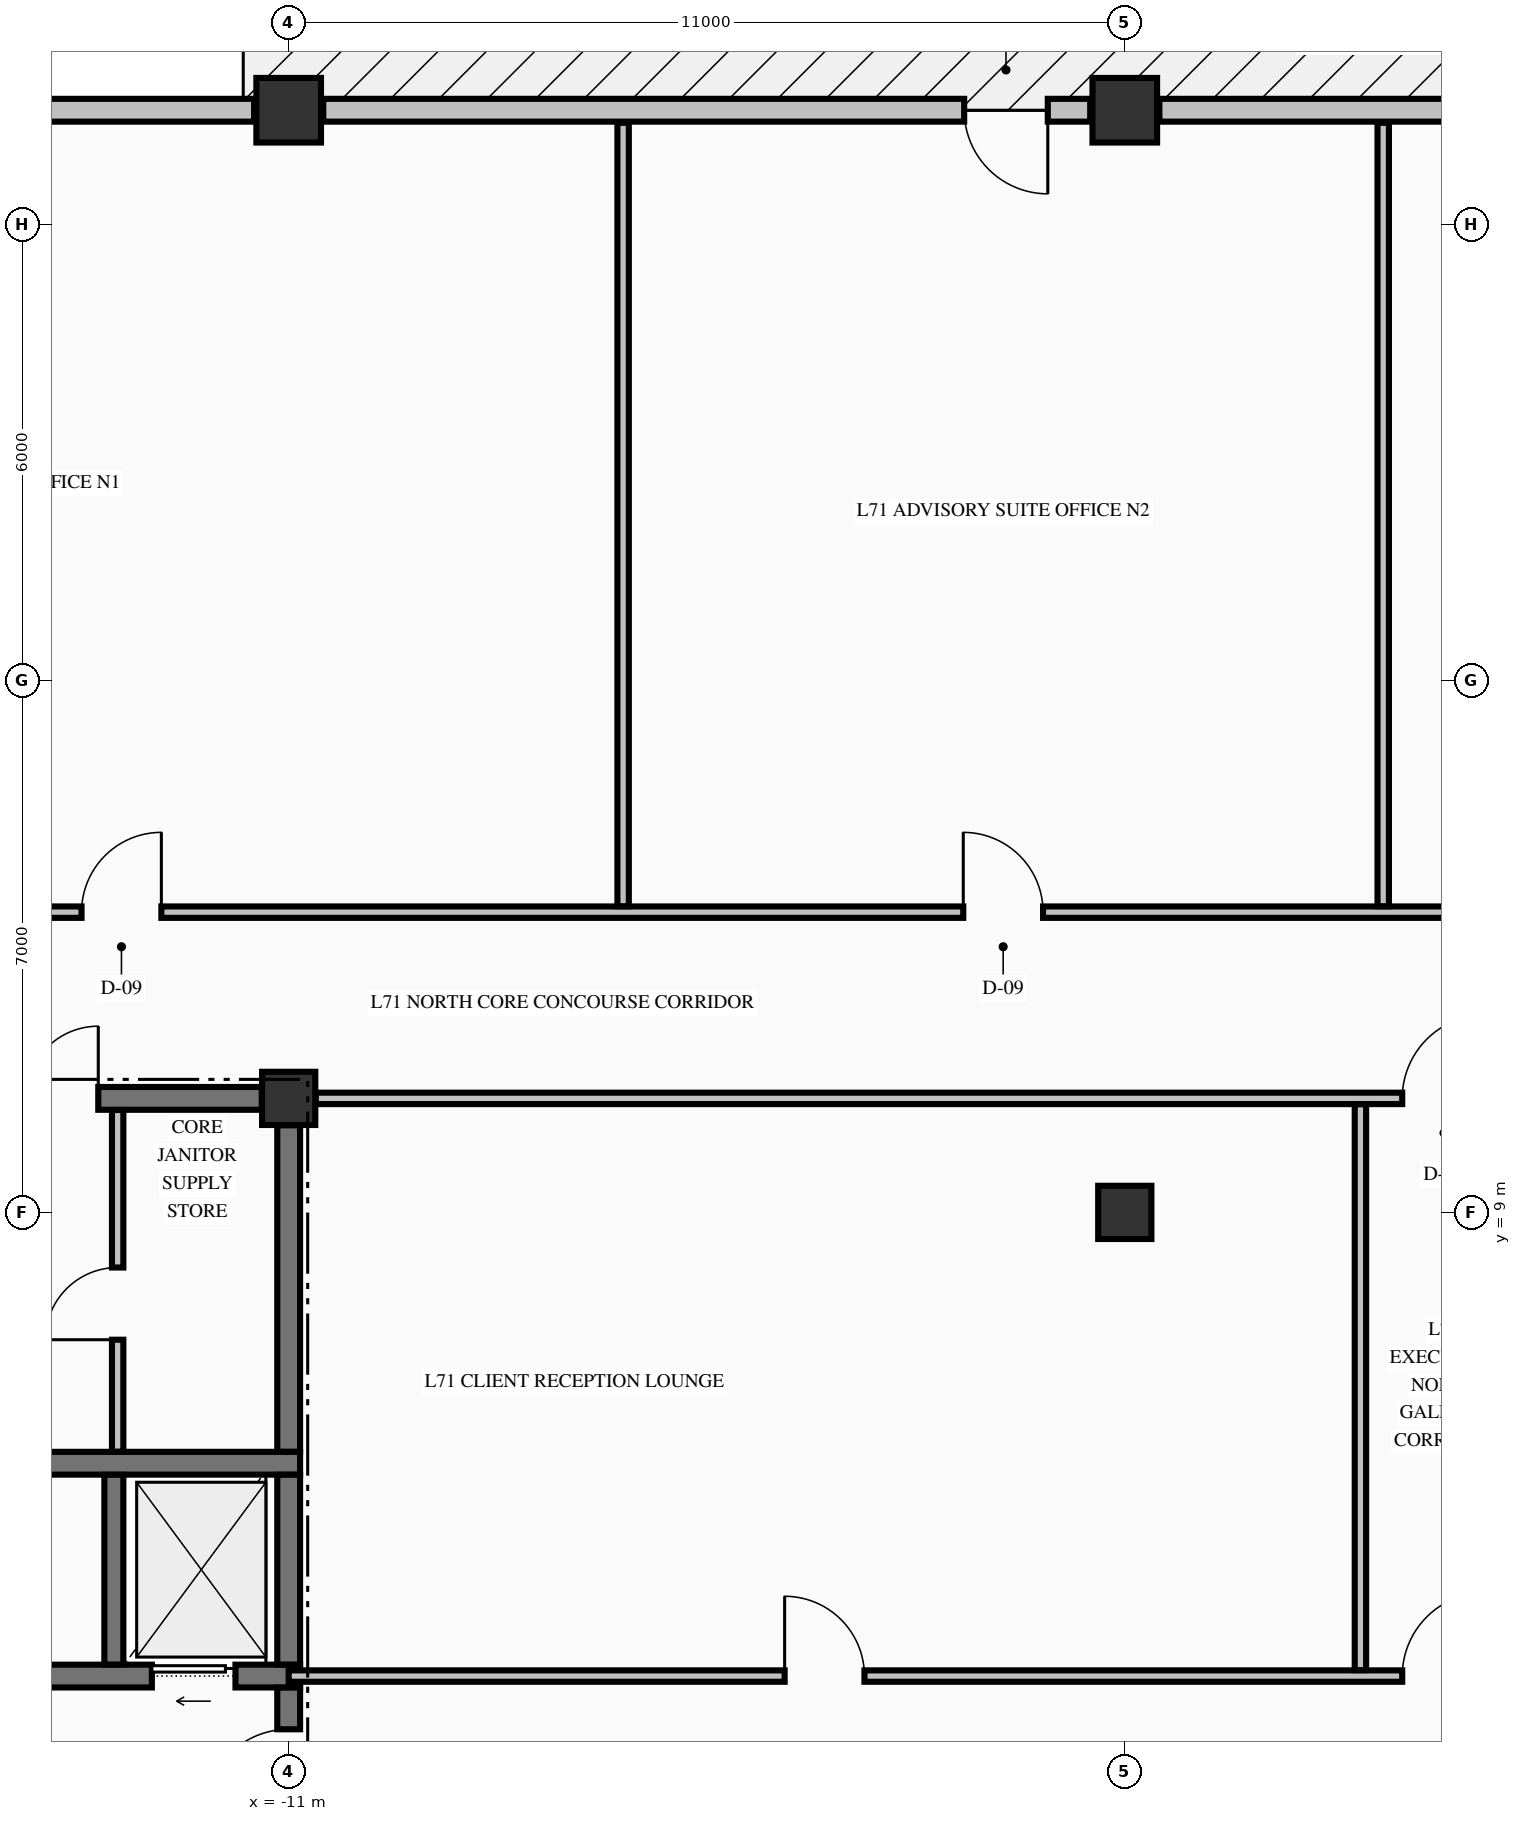
"""IFC4 building model, lengths in metres.
Left out: names, types, materials, properties, quantities, classifications, styles, units other than length and angle.
Written with IfcOpenShell. Run it as: python <this file> out.ifc"""

import sys

from ifc_helpers import new_model, si_unit, direction, frame, frame_2d, origin, origin_2d, place, context, subcontext, project, spatial, rectangle, extrude, element, fill, save


model = new_model("IFC4")
c1 = context("Model", 3, precision=1e-05, world=origin(), true_north=direction((0.0, 1.0)))
c2 = subcontext(c1, "Body", "Model", "MODEL_VIEW")
j1 = project(units=[si_unit("LENGTHUNIT", "METRE"), si_unit("PLANEANGLEUNIT", "RADIAN")], contexts=[c1])
p1 = place(None, origin())
s1 = spatial("IfcSite", under=j1, at=p1, CompositionType="ELEMENT")
p2 = place(p1, origin())
s2 = spatial("IfcBuilding", under=s1, at=p2, CompositionType="ELEMENT")
p3 = place(p2, frame((0.0, 0.0, 267.35)))
s3 = spatial("IfcBuildingStorey", under=s2, at=p3, CompositionType="ELEMENT", Elevation=267.35)
for number, where, z_axis, x_axis in (
    (1, (-11.0, 23.5, -0.25), (0.0, 0.0, 1.0), (1.0, 0.0, 0.0)),
    (2, (0.0, 23.5, -0.25), (0.0, 0.0, 1.0), (1.0, 0.0, 0.0)),
):
    element("IfcColumn", number, at=place(p3, frame(where, z_axis=z_axis, x_axis=x_axis)), inside=s3, PredefinedType="COLUMN", context=c2, shape_type="SweptSolid", body=[
        extrude(rectangle(XDim=0.85, YDim=0.85, at=origin_2d()), origin(), (0.0, 0.0, 1.0), 3.155),
    ])
for number, where, z_axis, x_axis in (
    (3, (-11.0, 10.5, -0.25), (0.0, 0.0, 1.0), (1.0, 0.0, 0.0)),
    (4, (0.0, 9.0, -0.25), (0.0, 0.0, 1.0), (1.0, 0.0, 0.0)),
):
    element("IfcColumn", number, at=place(p3, frame(where, z_axis=z_axis, x_axis=x_axis)), inside=s3, PredefinedType="COLUMN", context=c2, shape_type="SweptSolid", body=[
        extrude(rectangle(XDim=0.7, YDim=0.7, at=origin_2d()), origin(), (0.0, 0.0, 1.0), 3.155),
    ])
p4 = place(p3, frame((-11.455, 23.5, 0.0), z_axis=(0.0, 0.0, 1.0), x_axis=(-1.0, 0.0, 0.0)))
e5 = element("IfcWall", 5, at=p4, inside=s3, PredefinedType="STANDARD", context=c2, shape_type="SweptSolid", body=[
    extrude(rectangle(XDim=8.59, YDim=0.3, at=frame_2d((4.295, 0.0))), origin(), (0.0, 0.0, 1.0), 2.297),
])
p5 = place(p3, frame((-0.455, 23.5, 0.0), z_axis=(0.0, 0.0, 1.0), x_axis=(-1.0, 0.0, 0.0)))
e6 = element("IfcWall", 6, at=p5, inside=s3, PredefinedType="STANDARD", context=c2, shape_type="SweptSolid", body=[
    extrude(rectangle(XDim=10.09, YDim=0.3, at=frame_2d((5.045, 0.0))), origin(), (0.0, 0.0, 1.0), 2.297),
])
p6 = place(p5, frame((0.558, 0.0, 0.0)))
e7 = element("IfcOpeningElement", 7, at=p6, cuts=e6, PredefinedType="OPENING", context=c2, shape_type="SweptSolid", body=[
    extrude(rectangle(XDim=1.1, YDim=2.15, at=frame_2d((0.55, 1.075))), frame((0.0, 0.16, 0.0), z_axis=(0.0, -1.0, 0.0), x_axis=(1.0, 0.0, 0.0)), (0.0, 0.0, 1.0), 0.32),
])
p7 = place(p3, frame((10.545, 23.5, 0.0), z_axis=(0.0, 0.0, 1.0), x_axis=(-1.0, 0.0, 0.0)))
e8 = element("IfcWall", 8, at=p7, inside=s3, PredefinedType="STANDARD", context=c2, shape_type="SweptSolid", body=[
    extrude(rectangle(XDim=10.09, YDim=0.3, at=frame_2d((5.045, 0.0))), origin(), (0.0, 0.0, 1.0), 2.297),
])
p8 = place(p3, frame((-14.875, 2.9, 0.0), z_axis=(0.0, 0.0, 1.0), x_axis=(1.0, 0.0, 0.0)))
e9 = element("IfcWall", 9, at=p8, inside=s3, PredefinedType="SHEAR", context=c2, shape_type="SweptSolid", body=[
    extrude(rectangle(XDim=4.025, YDim=0.3, at=frame_2d((2.012, 0.0))), origin(), (0.0, 0.0, 1.0), 2.905),
])
p9 = place(p8, frame((2.075, 0.0, 0.0)))
e10 = element("IfcOpeningElement", 10, at=p9, cuts=e9, PredefinedType="OPENING", context=c2, shape_type="SweptSolid", body=[
    extrude(rectangle(XDim=1.1, YDim=2.2, at=frame_2d((0.55, 1.1))), frame((0.0, 0.16, 0.0), z_axis=(0.0, -1.0, 0.0), x_axis=(1.0, 0.0, 0.0)), (0.0, 0.0, 1.0), 0.32),
])
p10 = place(p3, frame((-14.875, 5.7, 0.0), z_axis=(0.0, 0.0, 1.0), x_axis=(1.0, 0.0, 0.0)))
e11 = element("IfcWall", 11, at=p10, inside=s3, PredefinedType="SHEAR", context=c2, shape_type="SweptSolid", body=[
    extrude(rectangle(XDim=4.025, YDim=0.3, at=frame_2d((2.012, 0.0))), origin(), (0.0, 0.0, 1.0), 2.905),
])
p11 = place(p3, frame((-14.7, 10.5, 0.0), z_axis=(0.0, 0.0, 1.0), x_axis=(1.0, 0.0, 0.0)))
e12 = element("IfcWall", 12, at=p11, inside=s3, PredefinedType="SHEAR", context=c2, shape_type="SweptSolid", body=[
    extrude(rectangle(XDim=3.346, YDim=0.3, at=frame_2d((1.673, 0.0))), origin(), (0.0, 0.0, 1.0), 2.905),
])
p12 = place(p11, frame((0.245, 0.0, 0.0)))
e13 = element("IfcOpeningElement", 13, at=p12, cuts=e12, PredefinedType="OPENING", context=c2, shape_type="SweptSolid", body=[
    extrude(rectangle(XDim=0.95, YDim=2.15, at=frame_2d((0.475, 1.075))), frame((0.0, 0.16, 0.0), z_axis=(0.0, -1.0, 0.0), x_axis=(1.0, 0.0, 0.0)), (0.0, 0.0, 1.0), 0.32),
])
p13 = place(p3, frame((-11.0, 2.9, 0.0), z_axis=(0.0, 0.0, 1.0), x_axis=(1.0, 0.0, 0.0)))
e14 = element("IfcWall", 14, at=p13, inside=s3, PredefinedType="PARTITIONING", context=c2, shape_type="SweptSolid", body=[
    extrude(rectangle(XDim=22.0, YDim=0.15, at=frame_2d((11.0, 0.0))), origin(), (0.0, 0.0, 1.0), 2.905),
])
p14 = place(p13, frame((14.65, 0.0, 0.0)))
e15 = element("IfcOpeningElement", 15, at=p14, cuts=e14, PredefinedType="OPENING", context=c2, shape_type="SweptSolid", body=[
    extrude(rectangle(XDim=1.1, YDim=2.15, at=frame_2d((0.55, 1.075))), frame((0.0, 0.085, 0.0), z_axis=(0.0, -1.0, 0.0), x_axis=(1.0, 0.0, 0.0)), (0.0, 0.0, 1.0), 0.17),
])
p15 = place(p13, frame((6.525, 0.0, 0.0)))
e16 = element("IfcOpeningElement", 16, at=p15, cuts=e14, PredefinedType="OPENING", context=c2, shape_type="SweptSolid", body=[
    extrude(rectangle(XDim=1.05, YDim=2.15, at=frame_2d((0.525, 1.075))), frame((0.0, 0.085, 0.0), z_axis=(0.0, -1.0, 0.0), x_axis=(1.0, 0.0, 0.0)), (0.0, 0.0, 1.0), 0.17),
])
p16 = place(p13, frame((18.6, 0.0, 0.0)))
e17 = element("IfcOpeningElement", 17, at=p16, cuts=e14, PredefinedType="OPENING", context=c2, shape_type="SweptSolid", body=[
    extrude(rectangle(XDim=1.1, YDim=2.15, at=frame_2d((0.55, 1.075))), frame((0.0, 0.085, 0.0), z_axis=(0.0, -1.0, 0.0), x_axis=(1.0, 0.0, 0.0)), (0.0, 0.0, 1.0), 0.17),
])
p17 = place(p3, frame((-10.644, 10.5, 0.0), z_axis=(0.0, 0.0, 1.0), x_axis=(1.0, 0.0, 0.0)))
e18 = element("IfcWall", 18, at=p17, inside=s3, PredefinedType="PARTITIONING", context=c2, shape_type="SweptSolid", body=[
    extrude(rectangle(XDim=21.288, YDim=0.15, at=frame_2d((10.644, 0.0))), origin(), (0.0, 0.0, 1.0), 2.905),
])
p18 = place(p17, frame((14.294, 0.0, 0.0)))
e19 = element("IfcOpeningElement", 19, at=p18, cuts=e18, PredefinedType="OPENING", context=c2, shape_type="SweptSolid", body=[
    extrude(rectangle(XDim=1.1, YDim=2.15, at=frame_2d((0.55, 1.075))), frame((0.0, 0.085, 0.0), z_axis=(0.0, -1.0, 0.0), x_axis=(1.0, 0.0, 0.0)), (0.0, 0.0, 1.0), 0.17),
])
p19 = place(p3, frame((-25.835, 12.95, 0.0), z_axis=(0.0, 0.0, 1.0), x_axis=(1.0, 0.0, 0.0)))
e20 = element("IfcWall", 20, at=p19, inside=s3, PredefinedType="PARTITIONING", context=c2, shape_type="SweptSolid", body=[
    extrude(rectangle(XDim=45.91, YDim=0.15, at=frame_2d((22.955, 0.0))), origin(), (0.0, 0.0, 1.0), 2.905),
])
p20 = place(p19, frame((12.11, 0.0, 0.0)))
e21 = element("IfcOpeningElement", 21, at=p20, cuts=e20, PredefinedType="OPENING", context=c2, shape_type="SweptSolid", body=[
    extrude(rectangle(XDim=1.05, YDim=2.15, at=frame_2d((0.525, 1.075))), frame((0.0, 0.085, 0.0), z_axis=(0.0, -1.0, 0.0), x_axis=(1.0, 0.0, 0.0)), (0.0, 0.0, 1.0), 0.17),
])
p21 = place(p19, frame((23.71, 0.0, 0.0)))
e22 = element("IfcOpeningElement", 22, at=p21, cuts=e20, PredefinedType="OPENING", context=c2, shape_type="SweptSolid", body=[
    extrude(rectangle(XDim=1.05, YDim=2.15, at=frame_2d((0.525, 1.075))), frame((0.0, 0.085, 0.0), z_axis=(0.0, -1.0, 0.0), x_axis=(1.0, 0.0, 0.0)), (0.0, 0.0, 1.0), 0.17),
])
p22 = place(p19, frame((34.76, 0.0, 0.0)))
e23 = element("IfcOpeningElement", 23, at=p22, cuts=e20, PredefinedType="OPENING", context=c2, shape_type="SweptSolid", body=[
    extrude(rectangle(XDim=1.05, YDim=2.15, at=frame_2d((0.525, 1.075))), frame((0.0, 0.085, 0.0), z_axis=(0.0, -1.0, 0.0), x_axis=(1.0, 0.0, 0.0)), (0.0, 0.0, 1.0), 0.17),
])
p23 = place(p3, frame((-13.3, 3.052, 0.0), z_axis=(0.0, 0.0, 1.0), x_axis=(0.0, 1.0, 0.0)))
e24 = element("IfcWall", 24, at=p23, inside=s3, PredefinedType="SOLIDWALL", context=c2, shape_type="SweptSolid", body=[
    extrude(rectangle(XDim=2.496, YDim=0.25, at=frame_2d((1.248, 0.0))), origin(), (0.0, 0.0, 1.0), 2.905),
])
p24 = place(p3, frame((-11.0, 0.354, 0.0), z_axis=(0.0, 0.0, 1.0), x_axis=(0.0, 1.0, 0.0)))
e25 = element("IfcWall", 25, at=p24, inside=s3, PredefinedType="SHEAR", context=c2, shape_type="SweptSolid", body=[
    extrude(rectangle(XDim=2.394, YDim=0.3, at=frame_2d((1.197, 0.0))), origin(), (0.0, 0.0, 1.0), 2.905),
])
p25 = place(p24, frame((0.746, 0.0, 0.0)))
e26 = element("IfcOpeningElement", 26, at=p25, cuts=e25, PredefinedType="OPENING", context=c2, shape_type="SweptSolid", body=[
    extrude(rectangle(XDim=1.1, YDim=2.15, at=frame_2d((0.55, 1.075))), frame((0.0, 0.16, 0.0), z_axis=(0.0, -1.0, 0.0), x_axis=(1.0, 0.0, 0.0)), (0.0, 0.0, 1.0), 0.32),
])
p26 = place(p3, frame((-11.0, 3.052, 0.0), z_axis=(0.0, 0.0, 1.0), x_axis=(0.0, 1.0, 0.0)))
e27 = element("IfcWall", 27, at=p26, inside=s3, PredefinedType="SHEAR", context=c2, shape_type="SweptSolid", body=[
    extrude(rectangle(XDim=2.496, YDim=0.3, at=frame_2d((1.248, 0.0))), origin(), (0.0, 0.0, 1.0), 2.905),
])
p27 = place(p3, frame((-11.0, 5.852, 0.0), z_axis=(0.0, 0.0, 1.0), x_axis=(0.0, 1.0, 0.0)))
e28 = element("IfcWall", 28, at=p27, inside=s3, PredefinedType="SHEAR", context=c2, shape_type="SweptSolid", body=[
    extrude(rectangle(XDim=4.294, YDim=0.3, at=frame_2d((2.147, 0.0))), origin(), (0.0, 0.0, 1.0), 2.905),
])
p28 = place(p3, frame((-13.25, 5.853, 0.0), z_axis=(0.0, 0.0, 1.0), x_axis=(0.0, 1.0, 0.0)))
e29 = element("IfcWall", 29, at=p28, inside=s3, PredefinedType="PARTITIONING", context=c2, shape_type="SweptSolid", body=[
    extrude(rectangle(XDim=4.494, YDim=0.15, at=frame_2d((2.247, 0.0))), origin(), (0.0, 0.0, 1.0), 2.905),
])
p29 = place(p28, frame((1.472, 0.0, 0.0)))
e30 = element("IfcOpeningElement", 30, at=p29, cuts=e29, PredefinedType="OPENING", context=c2, shape_type="SweptSolid", body=[
    extrude(rectangle(XDim=0.95, YDim=2.15, at=frame_2d((0.475, 1.075))), frame((0.0, 0.085, 0.0), z_axis=(0.0, -1.0, 0.0), x_axis=(1.0, 0.0, 0.0)), (0.0, 0.0, 1.0), 0.17),
])
p30 = place(p3, frame((-6.6, 13.028, 0.0), z_axis=(0.0, 0.0, 1.0), x_axis=(0.0, 1.0, 0.0)))
e31 = element("IfcWall", 31, at=p30, inside=s3, PredefinedType="PARTITIONING", context=c2, shape_type="SweptSolid", body=[
    extrude(rectangle(XDim=10.307, YDim=0.15, at=frame_2d((5.153, 0.0))), origin(), (0.0, 0.0, 1.0), 2.905),
])
p31 = place(p3, frame((3.1, 2.978, 0.0), z_axis=(0.0, 0.0, 1.0), x_axis=(0.0, 1.0, 0.0)))
e32 = element("IfcWall", 32, at=p31, inside=s3, PredefinedType="PARTITIONING", context=c2, shape_type="SweptSolid", body=[
    extrude(rectangle(XDim=7.444, YDim=0.15, at=frame_2d((3.722, 0.0))), origin(), (0.0, 0.0, 1.0), 2.905),
])
p32 = place(p3, frame((3.4, 13.028, 0.0), z_axis=(0.0, 0.0, 1.0), x_axis=(0.0, 1.0, 0.0)))
e33 = element("IfcWall", 33, at=p32, inside=s3, PredefinedType="PARTITIONING", context=c2, shape_type="SweptSolid", body=[
    extrude(rectangle(XDim=10.307, YDim=0.15, at=frame_2d((5.153, 0.0))), origin(), (0.0, 0.0, 1.0), 2.905),
])
p33 = place(p6, origin())
e34 = element("IfcDoor", 34, at=p33, inside=s3, OperationType="SINGLE_SWING_LEFT", PredefinedType="DOOR", context=c2, shape_type="SweptSolid", body=[
    extrude(rectangle(XDim=1.1, YDim=2.15, at=frame_2d((0.55, 1.075))), frame((0.0, 0.025, 0.0), z_axis=(0.0, -1.0, 0.0), x_axis=(1.0, 0.0, 0.0)), (0.0, 0.0, 1.0), 0.05),
])
fill(e7, e34)
p34 = place(p25, origin())
e35 = element("IfcDoor", 35, at=p34, inside=s3, OperationType="SINGLE_SWING_LEFT", PredefinedType="DOOR", context=c2, shape_type="SweptSolid", body=[
    extrude(rectangle(XDim=1.1, YDim=2.15, at=frame_2d((0.55, 1.075))), frame((0.0, 0.025, 0.0), z_axis=(0.0, -1.0, 0.0), x_axis=(1.0, 0.0, 0.0)), (0.0, 0.0, 1.0), 0.05),
])
fill(e26, e35)
p35 = place(p9, origin())
e36 = element("IfcDoor", 36, at=p35, inside=s3, OperationType="SLIDING_TO_LEFT", PredefinedType="DOOR", context=c2, shape_type="SweptSolid", body=[
    extrude(rectangle(XDim=1.1, YDim=2.2, at=frame_2d((0.55, 1.1))), frame((0.0, 0.025, 0.0), z_axis=(0.0, -1.0, 0.0), x_axis=(1.0, 0.0, 0.0)), (0.0, 0.0, 1.0), 0.05),
])
fill(e10, e36)
p36 = place(p12, origin())
e37 = element("IfcDoor", 37, at=p36, inside=s3, OperationType="SINGLE_SWING_RIGHT", PredefinedType="DOOR", context=c2, shape_type="SweptSolid", body=[
    extrude(rectangle(XDim=0.95, YDim=2.15, at=frame_2d((0.475, 1.075))), frame((0.0, 0.025, 0.0), z_axis=(0.0, -1.0, 0.0), x_axis=(1.0, 0.0, 0.0)), (0.0, 0.0, 1.0), 0.05),
])
fill(e13, e37)
p37 = place(p29, origin())
e38 = element("IfcDoor", 38, at=p37, inside=s3, OperationType="SINGLE_SWING_LEFT", PredefinedType="DOOR", context=c2, shape_type="SweptSolid", body=[
    extrude(rectangle(XDim=0.95, YDim=2.15, at=frame_2d((0.475, 1.075))), frame((0.0, 0.025, 0.0), z_axis=(0.0, -1.0, 0.0), x_axis=(1.0, 0.0, 0.0)), (0.0, 0.0, 1.0), 0.05),
])
fill(e30, e38)
p38 = place(p18, origin())
e39 = element("IfcDoor", 39, at=p38, inside=s3, OperationType="SINGLE_SWING_RIGHT", PredefinedType="DOOR", context=c2, shape_type="SweptSolid", body=[
    extrude(rectangle(XDim=1.1, YDim=2.15, at=frame_2d((0.55, 1.075))), frame((0.0, 0.025, 0.0), z_axis=(0.0, -1.0, 0.0), x_axis=(1.0, 0.0, 0.0)), (0.0, 0.0, 1.0), 0.05),
])
fill(e19, e39)
p39 = place(p14, origin())
e40 = element("IfcDoor", 40, at=p39, inside=s3, OperationType="SINGLE_SWING_RIGHT", PredefinedType="DOOR", context=c2, shape_type="SweptSolid", body=[
    extrude(rectangle(XDim=1.1, YDim=2.15, at=frame_2d((0.55, 1.075))), frame((0.0, 0.025, 0.0), z_axis=(0.0, -1.0, 0.0), x_axis=(1.0, 0.0, 0.0)), (0.0, 0.0, 1.0), 0.05),
])
fill(e15, e40)
p40 = place(p20, origin())
e41 = element("IfcDoor", 41, at=p40, inside=s3, OperationType="SINGLE_SWING_RIGHT", PredefinedType="DOOR", context=c2, shape_type="SweptSolid", body=[
    extrude(rectangle(XDim=1.05, YDim=2.15, at=frame_2d((0.525, 1.075))), frame((0.0, 0.025, 0.0), z_axis=(0.0, -1.0, 0.0), x_axis=(1.0, 0.0, 0.0)), (0.0, 0.0, 1.0), 0.05),
])
fill(e21, e41)
p41 = place(p21, origin())
e42 = element("IfcDoor", 42, at=p41, inside=s3, OperationType="SINGLE_SWING_LEFT", PredefinedType="DOOR", context=c2, shape_type="SweptSolid", body=[
    extrude(rectangle(XDim=1.05, YDim=2.15, at=frame_2d((0.525, 1.075))), frame((0.0, 0.025, 0.0), z_axis=(0.0, -1.0, 0.0), x_axis=(1.0, 0.0, 0.0)), (0.0, 0.0, 1.0), 0.05),
])
fill(e22, e42)
p42 = place(p15, origin())
e43 = element("IfcDoor", 43, at=p42, inside=s3, OperationType="SINGLE_SWING_LEFT", PredefinedType="DOOR", context=c2, shape_type="SweptSolid", body=[
    extrude(rectangle(XDim=1.05, YDim=2.15, at=frame_2d((0.525, 1.075))), frame((0.0, 0.025, 0.0), z_axis=(0.0, -1.0, 0.0), x_axis=(1.0, 0.0, 0.0)), (0.0, 0.0, 1.0), 0.05),
])
fill(e16, e43)
save(model, sys.argv[1])
